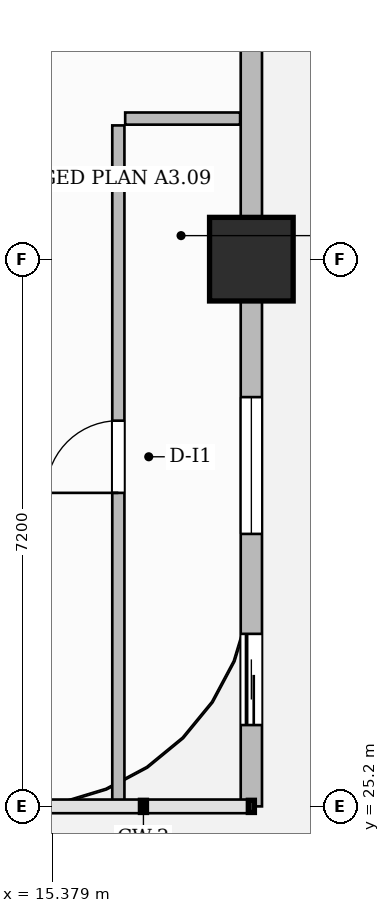
"""IFC4 building model, lengths in metres.
Left out: names, types, materials, properties, quantities, classifications, styles, units other than length and angle.
Written with IfcOpenShell. Run it as: python <this file> out.ifc"""

import sys

from ifc_helpers import new_model, si_unit, direction, frame, frame_2d, origin, origin_2d, place, context, subcontext, project, spatial, rectangle, extrude, source, transform, mapped, element, fill, save


model = new_model("IFC4")
c1 = context("Model", 3, precision=1e-05, world=origin(), true_north=direction((0.0, 1.0)))
c2 = subcontext(c1, "Body", "Model", "MODEL_VIEW")
j1 = project(units=[si_unit("LENGTHUNIT", "METRE"), si_unit("PLANEANGLEUNIT", "RADIAN")], contexts=[c1])
p1 = place(None, origin())
s1 = spatial("IfcSite", under=j1, at=p1, CompositionType="ELEMENT")
p2 = place(p1, origin())
s2 = spatial("IfcBuilding", under=s1, at=p2, CompositionType="ELEMENT")
p3 = place(p2, frame((0.0, 0.0, 43.5)))
s3 = spatial("IfcBuildingStorey", under=s2, at=p3, CompositionType="ELEMENT", Elevation=43.5)
m1 = source(origin(), c2, "Body", "SweptSolid", [
    extrude(rectangle(XDim=1.1, YDim=1.1, at=origin_2d()), origin(), (0.0, 0.0, 1.0), 3.7),
])
p4 = place(p3, frame((18.0, 32.4, 0.0), z_axis=(0.0, 0.0, 1.0), x_axis=(1.0, 0.0, 0.0)))
e1 = element("IfcColumn", 1, at=p4, inside=s3, PredefinedType="COLUMN", context=c2, shape_type="MappedRepresentation", body=[
    mapped(m1, transform((0.0, 0.0, 0.0), scale=1.0)),
])
p5 = place(p3, frame((16.25, 25.228, 0.0), z_axis=(0.0, 0.0, 1.0), x_axis=(0.0, 1.0, 0.0)))
e2 = element("IfcWall", 2, at=p5, inside=s3, PredefinedType="PARTITIONING", context=c2, shape_type="SweptSolid", body=[
    extrude(rectangle(XDim=8.932, YDim=0.16, at=frame_2d((4.466, 0.0))), origin(), (0.0, 0.0, 1.0), 3.45),
])
p6 = place(p5, frame((4.097, 0.0, 0.0)))
e3 = element("IfcOpeningElement", 3, at=p6, cuts=e2, PredefinedType="OPENING", context=c2, shape_type="SweptSolid", body=[
    extrude(rectangle(XDim=0.95, YDim=2.15, at=frame_2d((0.475, 1.075))), frame((0.0, 0.09, 0.0), z_axis=(0.0, -1.0, 0.0), x_axis=(1.0, 0.0, 0.0)), (0.0, 0.0, 1.0), 0.18),
])
p7 = place(p3, frame((16.34, 34.25, 0.0), z_axis=(0.0, 0.0, 1.0), x_axis=(1.0, 0.0, 0.0)))
e4 = element("IfcWall", 4, at=p7, inside=s3, PredefinedType="PARTITIONING", context=c2, shape_type="SweptSolid", body=[
    extrude(rectangle(XDim=1.512, YDim=0.16, at=frame_2d((0.756, 0.0))), origin(), (0.0, 0.0, 1.0), 3.45),
])
p8 = place(p3, frame((18.0, 25.2, 0.0), z_axis=(0.0, 0.0, 1.0), x_axis=(0.0, 1.0, 0.0)))
e5 = element("IfcWall", 5, at=p8, inside=s3, PredefinedType="SOLIDWALL", context=c2, shape_type="SweptSolid", body=[
    extrude(rectangle(XDim=21.55, YDim=0.28, at=frame_2d((10.775, 0.0))), origin(), (0.0, 0.0, 1.0), 3.45),
])
p9 = place(p8, frame((18.5, 0.0, 0.0)))
e6 = element("IfcOpeningElement", 6, at=p9, cuts=e5, PredefinedType="OPENING", context=c2, shape_type="SweptSolid", body=[
    extrude(rectangle(XDim=1.2, YDim=2.2, at=frame_2d((0.6, 1.1))), frame((0.0, 0.15, 0.0), z_axis=(0.0, -1.0, 0.0), x_axis=(1.0, 0.0, 0.0)), (0.0, 0.0, 1.0), 0.3),
])
p10 = place(p8, frame((1.07, 0.0, 0.0)))
e7 = element("IfcOpeningElement", 7, at=p10, cuts=e5, PredefinedType="OPENING", context=c2, shape_type="SweptSolid", body=[
    extrude(rectangle(XDim=1.2, YDim=2.2, at=frame_2d((0.6, 1.1))), frame((0.0, 0.15, 0.0), z_axis=(0.0, -1.0, 0.0), x_axis=(1.0, 0.0, 0.0)), (0.0, 0.0, 1.0), 0.3),
])
p11 = place(p8, frame((3.585, 0.0, 0.8)))
e8 = element("IfcOpeningElement", 8, at=p11, cuts=e5, PredefinedType="OPENING", context=c2, shape_type="SweptSolid", body=[
    extrude(rectangle(XDim=1.8, YDim=1.85, at=frame_2d((0.9, 0.925))), frame((0.0, 0.15, 0.0), z_axis=(0.0, -1.0, 0.0), x_axis=(1.0, 0.0, 0.0)), (0.0, 0.0, 1.0), 0.3),
])
p12 = place(p8, frame((10.428, 0.0, 0.8)))
e9 = element("IfcOpeningElement", 9, at=p12, cuts=e5, PredefinedType="OPENING", context=c2, shape_type="SweptSolid", body=[
    extrude(rectangle(XDim=1.8, YDim=1.85, at=frame_2d((0.9, 0.925))), frame((0.0, 0.15, 0.0), z_axis=(0.0, -1.0, 0.0), x_axis=(1.0, 0.0, 0.0)), (0.0, 0.0, 1.0), 0.3),
])
p13 = place(p8, frame((15.8, 0.0, 0.8)))
e10 = element("IfcOpeningElement", 10, at=p13, cuts=e5, PredefinedType="OPENING", context=c2, shape_type="SweptSolid", body=[
    extrude(rectangle(XDim=1.8, YDim=1.85, at=frame_2d((0.9, 0.925))), frame((0.0, 0.15, 0.0), z_axis=(0.0, -1.0, 0.0), x_axis=(1.0, 0.0, 0.0)), (0.0, 0.0, 1.0), 0.3),
])
m2 = source(origin(), c2, "Body", "SweptSolid", [
    extrude(rectangle(XDim=0.95, YDim=2.15, at=frame_2d((0.475, 1.075))), frame((0.0, 0.025, 0.0), z_axis=(0.0, -1.0, 0.0), x_axis=(1.0, 0.0, 0.0)), (0.0, 0.0, 1.0), 0.05),
])
p14 = place(p6, origin())
e11 = element("IfcDoor", 11, at=p14, inside=s3, OperationType="SINGLE_SWING_LEFT", PredefinedType="DOOR", context=c2, shape_type="MappedRepresentation", body=[
    mapped(m2, transform((0.0, 0.0, 0.0), scale=1.0)),
])
fill(e3, e11)
m3 = source(origin(), c2, "Body", "SweptSolid", [
    extrude(rectangle(XDim=1.2, YDim=2.2, at=frame_2d((0.6, 1.1))), frame((0.0, 0.025, 0.0), z_axis=(0.0, -1.0, 0.0), x_axis=(1.0, 0.0, 0.0)), (0.0, 0.0, 1.0), 0.05),
])
p15 = place(p10, origin())
e12 = element("IfcDoor", 12, at=p15, inside=s3, OperationType="SLIDING_TO_LEFT", PredefinedType="DOOR", context=c2, shape_type="MappedRepresentation", body=[
    mapped(m3, transform((0.0, 0.0, 0.0), scale=1.0)),
])
fill(e7, e12)
m4 = source(origin(), c2, "Body", "SweptSolid", [
    extrude(rectangle(XDim=1.8, YDim=1.85, at=frame_2d((0.9, 0.925))), frame((0.0, 0.03, 0.0), z_axis=(0.0, -1.0, 0.0), x_axis=(1.0, 0.0, 0.0)), (0.0, 0.0, 1.0), 0.06),
])
p16 = place(p11, origin())
e13 = element("IfcWindow", 13, at=p16, inside=s3, PartitioningType="DOUBLE_PANEL_VERTICAL", PredefinedType="WINDOW", context=c2, shape_type="MappedRepresentation", body=[
    mapped(m4, transform((0.0, 0.0, 0.0), scale=1.0)),
])
fill(e8, e13)
save(model, sys.argv[1])
